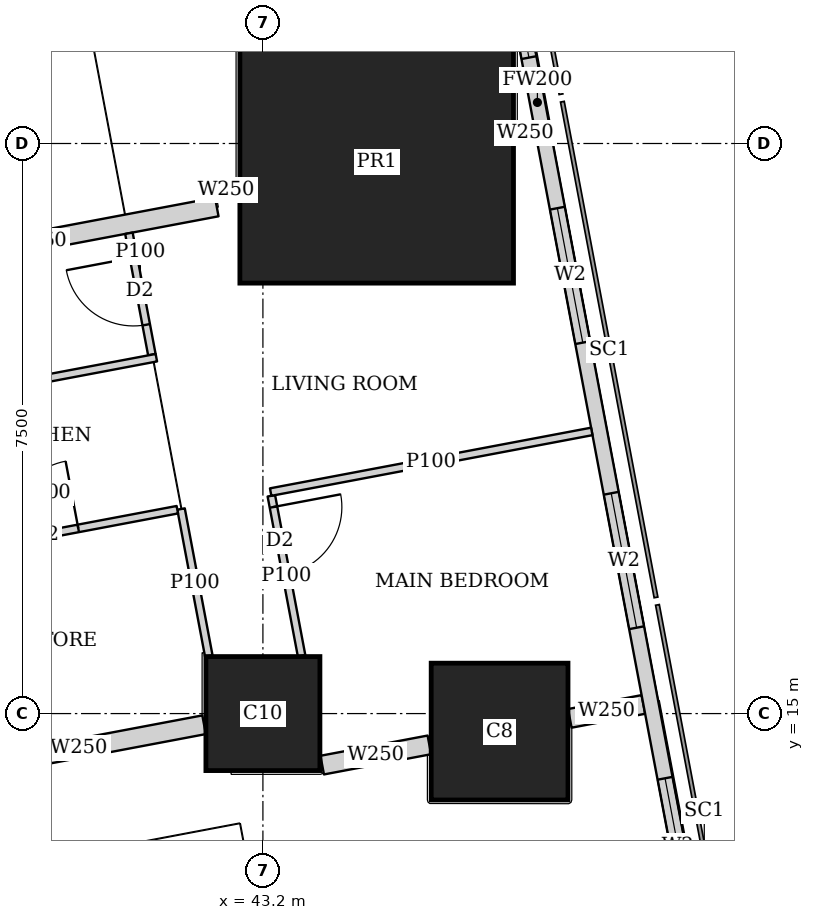
"""IFC4 building model, lengths in metres.
Left out: names, types, materials, properties, quantities, classifications, styles, units other than length and angle.
Written with IfcOpenShell. Run it as: python <this file> out.ifc"""

import sys

from ifc_helpers import new_model, si_unit, direction, frame, frame_2d, origin, origin_2d, place, context, subcontext, project, spatial, rectangle, extrude, element, fill, save


model = new_model("IFC4")
c1 = context("Model", 3, precision=1e-05, world=origin(), true_north=direction((0.0, 1.0)))
c2 = subcontext(c1, "Body", "Model", "MODEL_VIEW")
j1 = project(units=[si_unit("LENGTHUNIT", "METRE"), si_unit("PLANEANGLEUNIT", "RADIAN")], contexts=[c1])
p1 = place(None, origin())
s1 = spatial("IfcSite", under=j1, at=p1, CompositionType="ELEMENT")
p2 = place(p1, origin())
s2 = spatial("IfcBuilding", under=s1, at=p2, CompositionType="ELEMENT")
p3 = place(p2, frame((0.0, 0.0, 135.8)))
s3 = spatial("IfcBuildingStorey", under=s2, at=p3, CompositionType="ELEMENT", Elevation=135.8)
p4 = place(p3, frame((43.2, 15.0, 0.0), z_axis=(0.0, 0.0, 1.0), x_axis=(1.0, 0.0, 0.0)))
e1 = element("IfcColumn", 1, at=p4, inside=s3, PredefinedType="COLUMN", context=c2, shape_type="SweptSolid", body=[
    extrude(rectangle(XDim=1.5, YDim=1.5, at=origin_2d()), origin(), (0.0, 0.0, 1.0), 3.75),
])
p5 = place(p3, frame((46.314, 14.763, 0.0), z_axis=(0.0, 0.0, 1.0), x_axis=(1.0, 0.0, 0.0)))
e2 = element("IfcColumn", 2, at=p5, inside=s3, PredefinedType="COLUMN", context=c2, shape_type="SweptSolid", body=[
    extrude(rectangle(XDim=1.8, YDim=1.8, at=origin_2d()), origin(), (0.0, 0.0, 1.0), 3.75),
])
p6 = place(p3, frame((44.697, 22.263, 0.0), z_axis=(0.0, 0.0, 1.0), x_axis=(1.0, 0.0, 0.0)))
e3 = element("IfcColumn", 3, at=p6, inside=s3, PredefinedType="COLUMN", context=c2, shape_type="SweptSolid", body=[
    extrude(rectangle(XDim=3.6, YDim=3.2, at=origin_2d()), origin(), (0.0, 0.0, 1.0), 3.75),
])
p7 = place(p3, frame((50.653, 2.703, 0.0), z_axis=(0.0, 0.0, 1.0), x_axis=(-0.185612026696, 0.982623109613, 0.0)))
e4 = element("IfcWall", 4, at=p7, inside=s3, PredefinedType="SOLIDWALL", context=c2, shape_type="SweptSolid", body=[
    extrude(rectangle(XDim=41.393, YDim=0.2, at=frame_2d((20.697, 0.0))), origin(), (0.0, 0.0, 1.0), 3.5),
])
p8 = place(p7, frame((1.633, 0.0, 0.9)))
e5 = element("IfcOpeningElement", 5, at=p8, cuts=e4, PredefinedType="OPENING", context=c2, shape_type="SweptSolid", body=[
    extrude(rectangle(XDim=1.8, YDim=1.5, at=frame_2d((0.9, 0.75))), frame((0.0, 0.11, 0.0), z_axis=(0.0, -1.0, 0.0), x_axis=(1.0, 0.0, 0.0)), (0.0, 0.0, 1.0), 0.22),
])
p9 = place(p7, frame((6.032, 0.0, 0.9)))
e6 = element("IfcOpeningElement", 6, at=p9, cuts=e4, PredefinedType="OPENING", context=c2, shape_type="SweptSolid", body=[
    extrude(rectangle(XDim=1.8, YDim=1.5, at=frame_2d((0.9, 0.75))), frame((0.0, 0.11, 0.0), z_axis=(0.0, -1.0, 0.0), x_axis=(1.0, 0.0, 0.0)), (0.0, 0.0, 1.0), 0.22),
])
p10 = place(p7, frame((9.848, 0.0, 0.9)))
e7 = element("IfcOpeningElement", 7, at=p10, cuts=e4, PredefinedType="OPENING", context=c2, shape_type="SweptSolid", body=[
    extrude(rectangle(XDim=1.8, YDim=1.5, at=frame_2d((0.9, 0.75))), frame((0.0, 0.11, 0.0), z_axis=(0.0, -1.0, 0.0), x_axis=(1.0, 0.0, 0.0)), (0.0, 0.0, 1.0), 0.22),
])
p11 = place(p7, frame((13.664, 0.0, 0.9)))
e8 = element("IfcOpeningElement", 8, at=p11, cuts=e4, PredefinedType="OPENING", context=c2, shape_type="SweptSolid", body=[
    extrude(rectangle(XDim=1.8, YDim=1.5, at=frame_2d((0.9, 0.75))), frame((0.0, 0.11, 0.0), z_axis=(0.0, -1.0, 0.0), x_axis=(1.0, 0.0, 0.0)), (0.0, 0.0, 1.0), 0.22),
])
p12 = place(p7, frame((17.481, 0.0, 0.9)))
e9 = element("IfcOpeningElement", 9, at=p12, cuts=e4, PredefinedType="OPENING", context=c2, shape_type="SweptSolid", body=[
    extrude(rectangle(XDim=1.8, YDim=1.5, at=frame_2d((0.9, 0.75))), frame((0.0, 0.11, 0.0), z_axis=(0.0, -1.0, 0.0), x_axis=(1.0, 0.0, 0.0)), (0.0, 0.0, 1.0), 0.22),
])
p13 = place(p7, frame((21.297, 0.0, 0.9)))
e10 = element("IfcOpeningElement", 10, at=p13, cuts=e4, PredefinedType="OPENING", context=c2, shape_type="SweptSolid", body=[
    extrude(rectangle(XDim=1.8, YDim=1.5, at=frame_2d((0.9, 0.75))), frame((0.0, 0.11, 0.0), z_axis=(0.0, -1.0, 0.0), x_axis=(1.0, 0.0, 0.0)), (0.0, 0.0, 1.0), 0.22),
])
p14 = place(p7, frame((25.113, 0.0, 0.9)))
e11 = element("IfcOpeningElement", 11, at=p14, cuts=e4, PredefinedType="OPENING", context=c2, shape_type="SweptSolid", body=[
    extrude(rectangle(XDim=1.8, YDim=1.5, at=frame_2d((0.9, 0.75))), frame((0.0, 0.11, 0.0), z_axis=(0.0, -1.0, 0.0), x_axis=(1.0, 0.0, 0.0)), (0.0, 0.0, 1.0), 0.22),
])
p15 = place(p7, frame((28.93, 0.0, 0.9)))
e12 = element("IfcOpeningElement", 12, at=p15, cuts=e4, PredefinedType="OPENING", context=c2, shape_type="SweptSolid", body=[
    extrude(rectangle(XDim=1.8, YDim=1.5, at=frame_2d((0.9, 0.75))), frame((0.0, 0.11, 0.0), z_axis=(0.0, -1.0, 0.0), x_axis=(1.0, 0.0, 0.0)), (0.0, 0.0, 1.0), 0.22),
])
p16 = place(p7, frame((32.746, 0.0, 0.9)))
e13 = element("IfcOpeningElement", 13, at=p16, cuts=e4, PredefinedType="OPENING", context=c2, shape_type="SweptSolid", body=[
    extrude(rectangle(XDim=1.8, YDim=1.5, at=frame_2d((0.9, 0.75))), frame((0.0, 0.11, 0.0), z_axis=(0.0, -1.0, 0.0), x_axis=(1.0, 0.0, 0.0)), (0.0, 0.0, 1.0), 0.22),
])
p17 = place(p7, frame((36.481, 0.0, 0.9)))
e14 = element("IfcOpeningElement", 14, at=p17, cuts=e4, PredefinedType="OPENING", context=c2, shape_type="SweptSolid", body=[
    extrude(rectangle(XDim=1.8, YDim=1.5, at=frame_2d((0.9, 0.75))), frame((0.0, 0.11, 0.0), z_axis=(0.0, -1.0, 0.0), x_axis=(1.0, 0.0, 0.0)), (0.0, 0.0, 1.0), 0.22),
])
p18 = place(p3, frame((33.623, 43.022, 0.0), z_axis=(0.0, 0.0, 1.0), x_axis=(0.185596841028, -0.98262597798, 0.0)))
e15 = element("IfcWall", 15, at=p18, inside=s3, PredefinedType="SOLIDWALL", context=c2, shape_type="SweptSolid", body=[
    extrude(rectangle(XDim=41.66, YDim=0.15, at=frame_2d((20.83, 0.0))), origin(), (0.0, 0.0, 1.0), 2.5),
])
p19 = place(p18, frame((20.242, 0.0, 0.0)))
e16 = element("IfcOpeningElement", 16, at=p19, cuts=e15, PredefinedType="OPENING", context=c2, shape_type="SweptSolid", body=[
    extrude(rectangle(XDim=1.0, YDim=2.1, at=frame_2d((0.5, 1.05))), frame((0.0, 0.085, 0.0), z_axis=(0.0, -1.0, 0.0), x_axis=(1.0, 0.0, 0.0)), (0.0, 0.0, 1.0), 0.17),
])
p20 = place(p18, frame((24.714, 0.0, 0.0)))
e17 = element("IfcOpeningElement", 17, at=p20, cuts=e15, PredefinedType="OPENING", context=c2, shape_type="SweptSolid", body=[
    extrude(rectangle(XDim=1.0, YDim=2.1, at=frame_2d((0.5, 1.05))), frame((0.0, 0.085, 0.0), z_axis=(0.0, -1.0, 0.0), x_axis=(1.0, 0.0, 0.0)), (0.0, 0.0, 1.0), 0.17),
])
p21 = place(p18, frame((31.206, 0.0, 0.0)))
e18 = element("IfcOpeningElement", 18, at=p21, cuts=e15, PredefinedType="OPENING", context=c2, shape_type="SweptSolid", body=[
    extrude(rectangle(XDim=1.0, YDim=2.1, at=frame_2d((0.5, 1.05))), frame((0.0, 0.085, 0.0), z_axis=(0.0, -1.0, 0.0), x_axis=(1.0, 0.0, 0.0)), (0.0, 0.0, 1.0), 0.17),
])
p22 = place(p3, frame((41.437, 21.319, 0.0), z_axis=(0.0, 0.0, 1.0), x_axis=(0.185793689589, -0.982588777113, 0.0)))
e19 = element("IfcWall", 19, at=p22, inside=s3, PredefinedType="PARTITIONING", context=c2, shape_type="SweptSolid", body=[
    extrude(rectangle(XDim=1.625, YDim=0.1, at=frame_2d((0.813, 0.0))), origin(), (0.0, 0.0, 1.0), 3.5),
])
p23 = place(p22, frame((0.325, 0.0, 0.0)))
e20 = element("IfcOpeningElement", 20, at=p23, cuts=e19, PredefinedType="OPENING", context=c2, shape_type="SweptSolid", body=[
    extrude(rectangle(XDim=0.9, YDim=2.1, at=frame_2d((0.45, 1.05))), frame((0.0, 0.06, 0.0), z_axis=(0.0, -1.0, 0.0), x_axis=(1.0, 0.0, 0.0)), (0.0, 0.0, 1.0), 0.12),
])
p24 = place(p3, frame((41.798, 19.682, 0.0), z_axis=(0.0, 0.0, 1.0), x_axis=(-0.982681091817, -0.185304807776, 0.0)))
e21 = element("IfcWall", 21, at=p24, inside=s3, PredefinedType="PARTITIONING", context=c2, shape_type="SweptSolid", body=[
    extrude(rectangle(XDim=3.626, YDim=0.1, at=frame_2d((1.813, 0.0))), origin(), (0.0, 0.0, 1.0), 3.5),
])
p25 = place(p3, frame((43.311, 17.865, 0.0), z_axis=(0.0, 0.0, 1.0), x_axis=(0.185760825203, -0.982594990736, 0.0)))
e22 = element("IfcWall", 22, at=p25, inside=s3, PredefinedType="PARTITIONING", context=c2, shape_type="SweptSolid", body=[
    extrude(rectangle(XDim=2.142, YDim=0.1, at=frame_2d((1.071, 0.0))), origin(), (0.0, 0.0, 1.0), 3.5),
])
p26 = place(p25, frame((0.15, 0.0, 0.0)))
e23 = element("IfcOpeningElement", 23, at=p26, cuts=e22, PredefinedType="OPENING", context=c2, shape_type="SweptSolid", body=[
    extrude(rectangle(XDim=0.9, YDim=2.1, at=frame_2d((0.45, 1.05))), frame((0.0, 0.06, 0.0), z_axis=(0.0, -1.0, 0.0), x_axis=(1.0, 0.0, 0.0)), (0.0, 0.0, 1.0), 0.12),
])
p27 = place(p3, frame((42.123, 17.691, 0.0), z_axis=(0.0, 0.0, 1.0), x_axis=(0.185554843339, -0.982633909507, 0.0)))
e24 = element("IfcWall", 24, at=p27, inside=s3, PredefinedType="PARTITIONING", context=c2, shape_type="SweptSolid", body=[
    extrude(rectangle(XDim=1.967, YDim=0.1, at=frame_2d((0.983, 0.0))), origin(), (0.0, 0.0, 1.0), 3.5),
])
p28 = place(p3, frame((47.527, 18.712, 0.0), z_axis=(0.0, 0.0, 1.0), x_axis=(-0.982633535512, -0.185556823879, 0.0)))
e25 = element("IfcWall", 25, at=p28, inside=s3, PredefinedType="PARTITIONING", context=c2, shape_type="SweptSolid", body=[
    extrude(rectangle(XDim=4.3, YDim=0.1, at=frame_2d((2.15, 0.0))), origin(), (0.0, 0.0, 1.0), 2.1),
])
p29 = place(p3, frame((42.074, 17.682, 0.0), z_axis=(0.0, 0.0, 1.0), x_axis=(-0.982660701716, -0.185412904897, 0.0)))
e26 = element("IfcWall", 26, at=p29, inside=s3, PredefinedType="PARTITIONING", context=c2, shape_type="SweptSolid", body=[
    extrude(rectangle(XDim=3.526, YDim=0.1, at=frame_2d((1.763, 0.0))), origin(), (0.0, 0.0, 1.0), 3.5),
])
p30 = place(p29, frame((1.326, 0.0, 0.0)))
e27 = element("IfcOpeningElement", 27, at=p30, cuts=e26, PredefinedType="OPENING", context=c2, shape_type="SweptSolid", body=[
    extrude(rectangle(XDim=0.9, YDim=2.1, at=frame_2d((0.45, 1.05))), frame((0.0, 0.06, 0.0), z_axis=(0.0, -1.0, 0.0), x_axis=(1.0, 0.0, 0.0)), (0.0, 0.0, 1.0), 0.12),
])
p31 = place(p3, frame((46.782, 22.657, 0.0), z_axis=(0.0, 0.0, 1.0), x_axis=(-0.982104607121, -0.188336243648, 0.0)))
e28 = element("IfcWall", 28, at=p31, inside=s3, PredefinedType="SOLIDWALL", context=c2, shape_type="SweptSolid", body=[
    extrude(rectangle(XDim=0.266, YDim=0.25, at=frame_2d((0.133, 0.0))), origin(), (0.0, 0.0, 1.0), 3.5),
])
p32 = place(p3, frame((42.873, 21.918, 0.0), z_axis=(0.0, 0.0, 1.0), x_axis=(-0.982431406936, -0.186624035603, 0.0)))
e29 = element("IfcWall", 29, at=p32, inside=s3, PredefinedType="SOLIDWALL", context=c2, shape_type="SweptSolid", body=[
    extrude(rectangle(XDim=0.322, YDim=0.25, at=frame_2d((0.161, 0.0))), origin(), (0.0, 0.0, 1.0), 2.5),
])
p33 = place(p3, frame((42.593, 21.665, 0.0), z_axis=(0.0, 0.0, 1.0), x_axis=(-0.982635807605, -0.185544791394, 0.0)))
e30 = element("IfcWall", 30, at=p33, inside=s3, PredefinedType="SOLIDWALL", context=c2, shape_type="SweptSolid", body=[
    extrude(rectangle(XDim=4.775, YDim=0.25, at=frame_2d((2.388, 0.0))), origin(), (0.0, 0.0, 1.0), 2.5),
])
p34 = place(p3, frame((48.206, 15.12, 0.0), z_axis=(0.0, 0.0, 1.0), x_axis=(-0.982576361834, -0.185859337043, 0.0)))
e31 = element("IfcWall", 31, at=p34, inside=s3, PredefinedType="SOLIDWALL", context=c2, shape_type="SweptSolid", body=[
    extrude(rectangle(XDim=0.985, YDim=0.25, at=frame_2d((0.493, 0.0))), origin(), (0.0, 0.0, 1.0), 2.1),
])
p35 = place(p3, frame((45.39, 14.588, 0.0), z_axis=(0.0, 0.0, 1.0), x_axis=(-0.982680951688, -0.18530555089, 0.0)))
e32 = element("IfcWall", 32, at=p35, inside=s3, PredefinedType="SOLIDWALL", context=c2, shape_type="SweptSolid", body=[
    extrude(rectangle(XDim=1.435, YDim=0.25, at=frame_2d((0.717, 0.0))), origin(), (0.0, 0.0, 1.0), 2.1),
])
p36 = place(p3, frame((42.426, 14.853, 0.0), z_axis=(0.0, 0.0, 1.0), x_axis=(-0.982633560103, -0.185556693654, 0.0)))
e33 = element("IfcWall", 33, at=p36, inside=s3, PredefinedType="SOLIDWALL", context=c2, shape_type="SweptSolid", body=[
    extrude(rectangle(XDim=3.347, YDim=0.25, at=frame_2d((1.674, 0.0))), origin(), (0.0, 0.0, 1.0), 3.5),
])
p37 = place(p10, origin())
e34 = element("IfcWindow", 34, at=p37, inside=s3, PartitioningType="SINGLE_PANEL", PredefinedType="WINDOW", context=c2, shape_type="SweptSolid", body=[
    extrude(rectangle(XDim=1.8, YDim=1.5, at=frame_2d((0.9, 0.75))), frame((0.0, 0.03, 0.0), z_axis=(0.0, -1.0, 0.0), x_axis=(1.0, 0.0, 0.0)), (0.0, 0.0, 1.0), 0.06),
])
fill(e7, e34)
p38 = place(p11, origin())
e35 = element("IfcWindow", 35, at=p38, inside=s3, PartitioningType="SINGLE_PANEL", PredefinedType="WINDOW", context=c2, shape_type="SweptSolid", body=[
    extrude(rectangle(XDim=1.8, YDim=1.5, at=frame_2d((0.9, 0.75))), frame((0.0, 0.03, 0.0), z_axis=(0.0, -1.0, 0.0), x_axis=(1.0, 0.0, 0.0)), (0.0, 0.0, 1.0), 0.06),
])
fill(e8, e35)
p39 = place(p12, origin())
e36 = element("IfcWindow", 36, at=p39, inside=s3, PartitioningType="SINGLE_PANEL", PredefinedType="WINDOW", context=c2, shape_type="SweptSolid", body=[
    extrude(rectangle(XDim=1.8, YDim=1.5, at=frame_2d((0.9, 0.75))), frame((0.0, 0.03, 0.0), z_axis=(0.0, -1.0, 0.0), x_axis=(1.0, 0.0, 0.0)), (0.0, 0.0, 1.0), 0.06),
])
fill(e9, e36)
p40 = place(p13, origin())
e37 = element("IfcWindow", 37, at=p40, inside=s3, PartitioningType="SINGLE_PANEL", PredefinedType="WINDOW", context=c2, shape_type="SweptSolid", body=[
    extrude(rectangle(XDim=1.8, YDim=1.5, at=frame_2d((0.9, 0.75))), frame((0.0, 0.03, 0.0), z_axis=(0.0, -1.0, 0.0), x_axis=(1.0, 0.0, 0.0)), (0.0, 0.0, 1.0), 0.06),
])
fill(e10, e37)
p41 = place(p23, origin())
e38 = element("IfcDoor", 38, at=p41, inside=s3, OperationType="SINGLE_SWING_RIGHT", PredefinedType="DOOR", context=c2, shape_type="SweptSolid", body=[
    extrude(rectangle(XDim=0.9, YDim=2.1, at=frame_2d((0.45, 1.05))), frame((0.0, 0.025, 0.0), z_axis=(0.0, -1.0, 0.0), x_axis=(1.0, 0.0, 0.0)), (0.0, 0.0, 1.0), 0.05),
])
fill(e20, e38)
p42 = place(p26, origin())
e39 = element("IfcDoor", 39, at=p42, inside=s3, OperationType="SINGLE_SWING_LEFT", PredefinedType="DOOR", context=c2, shape_type="SweptSolid", body=[
    extrude(rectangle(XDim=0.9, YDim=2.1, at=frame_2d((0.45, 1.05))), frame((0.0, 0.025, 0.0), z_axis=(0.0, -1.0, 0.0), x_axis=(1.0, 0.0, 0.0)), (0.0, 0.0, 1.0), 0.05),
])
fill(e23, e39)
p43 = place(p30, origin())
e40 = element("IfcDoor", 40, at=p43, inside=s3, OperationType="SINGLE_SWING_RIGHT", PredefinedType="DOOR", context=c2, shape_type="SweptSolid", body=[
    extrude(rectangle(XDim=0.9, YDim=2.1, at=frame_2d((0.45, 1.05))), frame((0.0, 0.025, 0.0), z_axis=(0.0, -1.0, 0.0), x_axis=(1.0, 0.0, 0.0)), (0.0, 0.0, 1.0), 0.05),
])
fill(e27, e40)
save(model, sys.argv[1])
